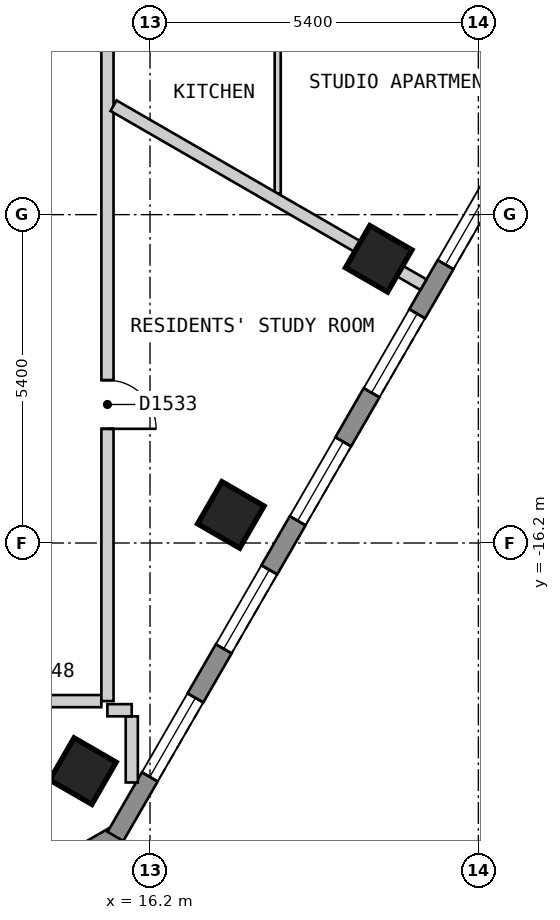
"""IFC4 building model, lengths in metres.
Left out: names, types, materials, properties, quantities, classifications, styles, units other than length and angle.
Written with IfcOpenShell. Run it as: python <this file> out.ifc"""

import sys

from ifc_helpers import new_model, si_unit, direction, frame, frame_2d, origin, origin_2d, place, context, subcontext, project, spatial, polyline, rectangle, outline, extrude, element, fill, save


model = new_model("IFC4")
c1 = context("Model", 3, precision=1e-05, world=origin(), true_north=direction((0.0, 1.0)))
c2 = subcontext(c1, "Body", "Model", "MODEL_VIEW")
j1 = project(units=[si_unit("LENGTHUNIT", "METRE"), si_unit("PLANEANGLEUNIT", "RADIAN")], contexts=[c1])
p1 = place(None, origin())
s1 = spatial("IfcSite", under=j1, at=p1, CompositionType="ELEMENT")
p2 = place(p1, origin())
s2 = spatial("IfcBuilding", under=s1, at=p2, CompositionType="ELEMENT")
p3 = place(p2, frame((0.0, 0.0, 184.2)))
s3 = spatial("IfcBuildingStorey", under=s2, at=p3, CompositionType="ELEMENT", Elevation=184.2)
for number, where, z_axis, x_axis in (
    (1, (15.097, -19.951, 0.0), (0.0, 0.0, 1.0), (0.5, 0.866, 0.0)),
    (2, (17.529, -15.738, 0.0), (0.0, 0.0, 1.0), (0.5, 0.866, 0.0)),
    (3, (19.961, -11.526, 0.0), (0.0, 0.0, 1.0), (0.5, 0.866, 0.0)),
):
    element("IfcColumn", number, at=place(p3, frame(where, z_axis=z_axis, x_axis=x_axis)), inside=s3, PredefinedType="COLUMN", context=c2, shape_type="SweptSolid", body=[
        extrude(rectangle(XDim=0.8, YDim=0.8, at=origin_2d()), origin(), (0.0, 0.0, 1.0), 3.0),
    ])
p4 = place(p3, frame((11.356, -23.47, 0.0), z_axis=(0.0, 0.0, 1.0), x_axis=(0.866022959057, 0.500004234368, 0.0)))
e4 = element("IfcWall", 4, at=p4, inside=s3, PredefinedType="SOLIDWALL", context=c2, shape_type="SweptSolid", body=[
    extrude(outline(polyline([(0.0, -0.15), (5.0, -0.15), (4.92, 0.15), (0.08, 0.15), (0.0, -0.15)])), origin(), (0.0, 0.0, 1.0), 2.7),
])
p5 = place(p4, frame((0.65, 0.0, 0.15)))
e5 = element("IfcOpeningElement", 5, at=p5, cuts=e4, PredefinedType="OPENING", context=c2, shape_type="SweptSolid", body=[
    extrude(rectangle(XDim=1.2, YDim=2.1, at=frame_2d((0.6, 1.05))), frame((0.0, 0.16, 0.0), z_axis=(0.0, -1.0, 0.0), x_axis=(1.0, 0.0, 0.0)), (0.0, 0.0, 1.0), 0.32),
])
p6 = place(p4, frame((3.149, 0.0, 0.15)))
e6 = element("IfcOpeningElement", 6, at=p6, cuts=e4, PredefinedType="OPENING", context=c2, shape_type="SweptSolid", body=[
    extrude(rectangle(XDim=1.2, YDim=2.1, at=frame_2d((0.6, 1.05))), frame((0.0, 0.16, 0.0), z_axis=(0.0, -1.0, 0.0), x_axis=(1.0, 0.0, 0.0)), (0.0, 0.0, 1.0), 0.32),
])
p7 = place(p3, frame((15.631, -21.025, 0.0), z_axis=(0.0, 0.0, 1.0), x_axis=(0.500018670445, 0.86601462413, 0.0)))
e7 = element("IfcWall", 7, at=p7, inside=s3, PredefinedType="SOLIDWALL", context=c2, shape_type="SweptSolid", body=[
    extrude(outline(polyline([(0.0, -0.15), (20.785, -0.15), (20.705, 0.15), (0.08, 0.15), (0.0, -0.15)])), origin(), (0.0, 0.0, 1.0), 2.7),
])
p8 = place(p7, frame((1.13, 0.0, 0.15)))
e8 = element("IfcOpeningElement", 8, at=p8, cuts=e7, PredefinedType="OPENING", context=c2, shape_type="SweptSolid", body=[
    extrude(rectangle(XDim=1.5, YDim=2.1, at=frame_2d((0.75, 1.05))), frame((0.0, 0.16, 0.0), z_axis=(0.0, -1.0, 0.0), x_axis=(1.0, 0.0, 0.0)), (0.0, 0.0, 1.0), 0.32),
])
p9 = place(p7, frame((3.562, 0.0, 0.15)))
e9 = element("IfcOpeningElement", 9, at=p9, cuts=e7, PredefinedType="OPENING", context=c2, shape_type="SweptSolid", body=[
    extrude(rectangle(XDim=1.5, YDim=2.1, at=frame_2d((0.75, 1.05))), frame((0.0, 0.16, 0.0), z_axis=(0.0, -1.0, 0.0), x_axis=(1.0, 0.0, 0.0)), (0.0, 0.0, 1.0), 0.32),
])
p10 = place(p7, frame((5.994, 0.0, 0.15)))
e10 = element("IfcOpeningElement", 10, at=p10, cuts=e7, PredefinedType="OPENING", context=c2, shape_type="SweptSolid", body=[
    extrude(rectangle(XDim=1.5, YDim=2.1, at=frame_2d((0.75, 1.05))), frame((0.0, 0.16, 0.0), z_axis=(0.0, -1.0, 0.0), x_axis=(1.0, 0.0, 0.0)), (0.0, 0.0, 1.0), 0.32),
])
p11 = place(p7, frame((8.425, 0.0, 0.15)))
e11 = element("IfcOpeningElement", 11, at=p11, cuts=e7, PredefinedType="OPENING", context=c2, shape_type="SweptSolid", body=[
    extrude(rectangle(XDim=1.5, YDim=2.1, at=frame_2d((0.75, 1.05))), frame((0.0, 0.16, 0.0), z_axis=(0.0, -1.0, 0.0), x_axis=(1.0, 0.0, 0.0)), (0.0, 0.0, 1.0), 0.32),
])
p12 = place(p7, frame((10.857, 0.0, 0.15)))
e12 = element("IfcOpeningElement", 12, at=p12, cuts=e7, PredefinedType="OPENING", context=c2, shape_type="SweptSolid", body=[
    extrude(rectangle(XDim=1.5, YDim=2.1, at=frame_2d((0.75, 1.05))), frame((0.0, 0.16, 0.0), z_axis=(0.0, -1.0, 0.0), x_axis=(1.0, 0.0, 0.0)), (0.0, 0.0, 1.0), 0.32),
])
p13 = place(p7, frame((13.289, 0.0, 0.15)))
e13 = element("IfcOpeningElement", 13, at=p13, cuts=e7, PredefinedType="OPENING", context=c2, shape_type="SweptSolid", body=[
    extrude(rectangle(XDim=1.5, YDim=2.1, at=frame_2d((0.75, 1.05))), frame((0.0, 0.16, 0.0), z_axis=(0.0, -1.0, 0.0), x_axis=(1.0, 0.0, 0.0)), (0.0, 0.0, 1.0), 0.32),
])
p14 = place(p7, frame((15.722, 0.0, 0.15)))
e14 = element("IfcOpeningElement", 14, at=p14, cuts=e7, PredefinedType="OPENING", context=c2, shape_type="SweptSolid", body=[
    extrude(rectangle(XDim=1.5, YDim=2.1, at=frame_2d((0.75, 1.05))), frame((0.0, 0.16, 0.0), z_axis=(0.0, -1.0, 0.0), x_axis=(1.0, 0.0, 0.0)), (0.0, 0.0, 1.0), 0.32),
])
p15 = place(p7, frame((18.154, 0.0, 0.15)))
e15 = element("IfcOpeningElement", 15, at=p15, cuts=e7, PredefinedType="OPENING", context=c2, shape_type="SweptSolid", body=[
    extrude(rectangle(XDim=1.5, YDim=2.1, at=frame_2d((0.75, 1.05))), frame((0.0, 0.16, 0.0), z_axis=(0.0, -1.0, 0.0), x_axis=(1.0, 0.0, 0.0)), (0.0, 0.0, 1.0), 0.32),
])
p16 = place(p3, frame((13.3, -18.8, 0.0), z_axis=(0.0, 0.0, 1.0), x_axis=(1.0, 0.0, 0.0)))
e16 = element("IfcWall", 16, at=p16, inside=s3, PredefinedType="PARTITIONING", context=c2, shape_type="SweptSolid", body=[
    extrude(rectangle(XDim=2.099, YDim=0.2, at=frame_2d((1.049, 0.0))), origin(), (0.0, 0.0, 1.0), 2.7),
])
p17 = place(p16, frame((0.2, 0.0, 0.0)))
e17 = element("IfcOpeningElement", 17, at=p17, cuts=e16, PredefinedType="OPENING", context=c2, shape_type="SweptSolid", body=[
    extrude(rectangle(XDim=1.0, YDim=2.1, at=frame_2d((0.5, 1.05))), frame((0.0, 0.11, 0.0), z_axis=(0.0, -1.0, 0.0), x_axis=(1.0, 0.0, 0.0)), (0.0, 0.0, 1.0), 0.22),
])
p18 = place(p3, frame((15.5, -18.799, 0.0), z_axis=(0.0, 0.0, 1.0), x_axis=(0.0, 1.0, 0.0)))
e18 = element("IfcWall", 18, at=p18, inside=s3, PredefinedType="PARTITIONING", context=c2, shape_type="SweptSolid", body=[
    extrude(rectangle(XDim=15.349, YDim=0.2, at=frame_2d((7.675, 0.0))), origin(), (0.0, 0.0, 1.0), 2.7),
])
p19 = place(p18, frame((4.477, 0.0, 0.0)))
e19 = element("IfcOpeningElement", 19, at=p19, cuts=e18, PredefinedType="OPENING", context=c2, shape_type="SweptSolid", body=[
    extrude(rectangle(XDim=0.8, YDim=2.1, at=frame_2d((0.4, 1.05))), frame((0.0, 0.11, 0.0), z_axis=(0.0, -1.0, 0.0), x_axis=(1.0, 0.0, 0.0)), (0.0, 0.0, 1.0), 0.22),
])
p20 = place(p18, frame((11.348, 0.0, 0.0)))
e20 = element("IfcOpeningElement", 20, at=p20, cuts=e18, PredefinedType="OPENING", context=c2, shape_type="SweptSolid", body=[
    extrude(rectangle(XDim=1.0, YDim=2.1, at=frame_2d((0.5, 1.05))), frame((0.0, 0.11, 0.0), z_axis=(0.0, -1.0, 0.0), x_axis=(1.0, 0.0, 0.0)), (0.0, 0.0, 1.0), 0.22),
])
p21 = place(p3, frame((18.3, -10.452, 0.0), z_axis=(0.0, 0.0, 1.0), x_axis=(0.0, 1.0, 0.0)))
e21 = element("IfcWall", 21, at=p21, inside=s3, PredefinedType="PARTITIONING", context=c2, shape_type="SweptSolid", body=[
    extrude(rectangle(XDim=5.386, YDim=0.1, at=frame_2d((2.693, 0.0))), origin(), (0.0, 0.0, 1.0), 2.7),
])
p22 = place(p21, frame((3.051, 0.0, 0.0)))
e22 = element("IfcOpeningElement", 22, at=p22, cuts=e21, PredefinedType="OPENING", context=c2, shape_type="SweptSolid", body=[
    extrude(rectangle(XDim=0.9, YDim=2.1, at=frame_2d((0.45, 1.05))), frame((0.0, 0.06, 0.0), z_axis=(0.0, -1.0, 0.0), x_axis=(1.0, 0.0, 0.0)), (0.0, 0.0, 1.0), 0.12),
])
p23 = place(p3, frame((15.9, -19.051, 0.0), z_axis=(0.0, 0.0, 1.0), x_axis=(0.0, -1.0, 0.0)))
e23 = element("IfcWall", 23, at=p23, inside=s3, PredefinedType="PARTITIONING", context=c2, shape_type="SweptSolid", body=[
    extrude(rectangle(XDim=1.087, YDim=0.2, at=frame_2d((0.543, 0.0))), origin(), (0.0, 0.0, 1.0), 2.7),
])
p24 = place(p3, frame((15.6, -9.008, 0.0), z_axis=(0.0, 0.0, 1.0), x_axis=(0.866013576751, -0.500020484464, 0.0)))
e24 = element("IfcWall", 24, at=p24, inside=s3, PredefinedType="PARTITIONING", context=c2, shape_type="SweptSolid", body=[
    extrude(rectangle(XDim=5.885, YDim=0.2, at=frame_2d((2.943, 0.0))), origin(), (0.0, 0.0, 1.0), 2.7),
])
p25 = place(p3, frame((15.499, -18.95, 0.0), z_axis=(0.0, 0.0, 1.0), x_axis=(1.0, 0.0, 0.0)))
e25 = element("IfcWall", 25, at=p25, inside=s3, PredefinedType="PARTITIONING", context=c2, shape_type="SweptSolid", body=[
    extrude(rectangle(XDim=0.4, YDim=0.2, at=frame_2d((0.2, 0.0))), origin(), (0.0, 0.0, 1.0), 2.7),
])
p26 = place(p8, origin())
e26 = element("IfcWindow", 26, at=p26, inside=s3, PartitioningType="SINGLE_PANEL", PredefinedType="WINDOW", context=c2, shape_type="SweptSolid", body=[
    extrude(rectangle(XDim=1.5, YDim=2.1, at=frame_2d((0.75, 1.05))), frame((0.0, 0.03, 0.0), z_axis=(0.0, -1.0, 0.0), x_axis=(1.0, 0.0, 0.0)), (0.0, 0.0, 1.0), 0.06),
])
fill(e8, e26)
p27 = place(p9, origin())
e27 = element("IfcWindow", 27, at=p27, inside=s3, PartitioningType="SINGLE_PANEL", PredefinedType="WINDOW", context=c2, shape_type="SweptSolid", body=[
    extrude(rectangle(XDim=1.5, YDim=2.1, at=frame_2d((0.75, 1.05))), frame((0.0, 0.03, 0.0), z_axis=(0.0, -1.0, 0.0), x_axis=(1.0, 0.0, 0.0)), (0.0, 0.0, 1.0), 0.06),
])
fill(e9, e27)
p28 = place(p10, origin())
e28 = element("IfcWindow", 28, at=p28, inside=s3, PartitioningType="SINGLE_PANEL", PredefinedType="WINDOW", context=c2, shape_type="SweptSolid", body=[
    extrude(rectangle(XDim=1.5, YDim=2.1, at=frame_2d((0.75, 1.05))), frame((0.0, 0.03, 0.0), z_axis=(0.0, -1.0, 0.0), x_axis=(1.0, 0.0, 0.0)), (0.0, 0.0, 1.0), 0.06),
])
fill(e10, e28)
p29 = place(p11, origin())
e29 = element("IfcWindow", 29, at=p29, inside=s3, PartitioningType="SINGLE_PANEL", PredefinedType="WINDOW", context=c2, shape_type="SweptSolid", body=[
    extrude(rectangle(XDim=1.5, YDim=2.1, at=frame_2d((0.75, 1.05))), frame((0.0, 0.03, 0.0), z_axis=(0.0, -1.0, 0.0), x_axis=(1.0, 0.0, 0.0)), (0.0, 0.0, 1.0), 0.06),
])
fill(e11, e29)
p30 = place(p12, origin())
e30 = element("IfcWindow", 30, at=p30, inside=s3, PartitioningType="SINGLE_PANEL", PredefinedType="WINDOW", context=c2, shape_type="SweptSolid", body=[
    extrude(rectangle(XDim=1.5, YDim=2.1, at=frame_2d((0.75, 1.05))), frame((0.0, 0.03, 0.0), z_axis=(0.0, -1.0, 0.0), x_axis=(1.0, 0.0, 0.0)), (0.0, 0.0, 1.0), 0.06),
])
fill(e12, e30)
p31 = place(p19, origin())
e31 = element("IfcDoor", 31, at=p31, inside=s3, OperationType="SINGLE_SWING_LEFT", PredefinedType="DOOR", context=c2, shape_type="SweptSolid", body=[
    extrude(rectangle(XDim=0.8, YDim=2.1, at=frame_2d((0.4, 1.05))), frame((0.0, 0.025, 0.0), z_axis=(0.0, -1.0, 0.0), x_axis=(1.0, 0.0, 0.0)), (0.0, 0.0, 1.0), 0.05),
])
fill(e19, e31)
save(model, sys.argv[1])
